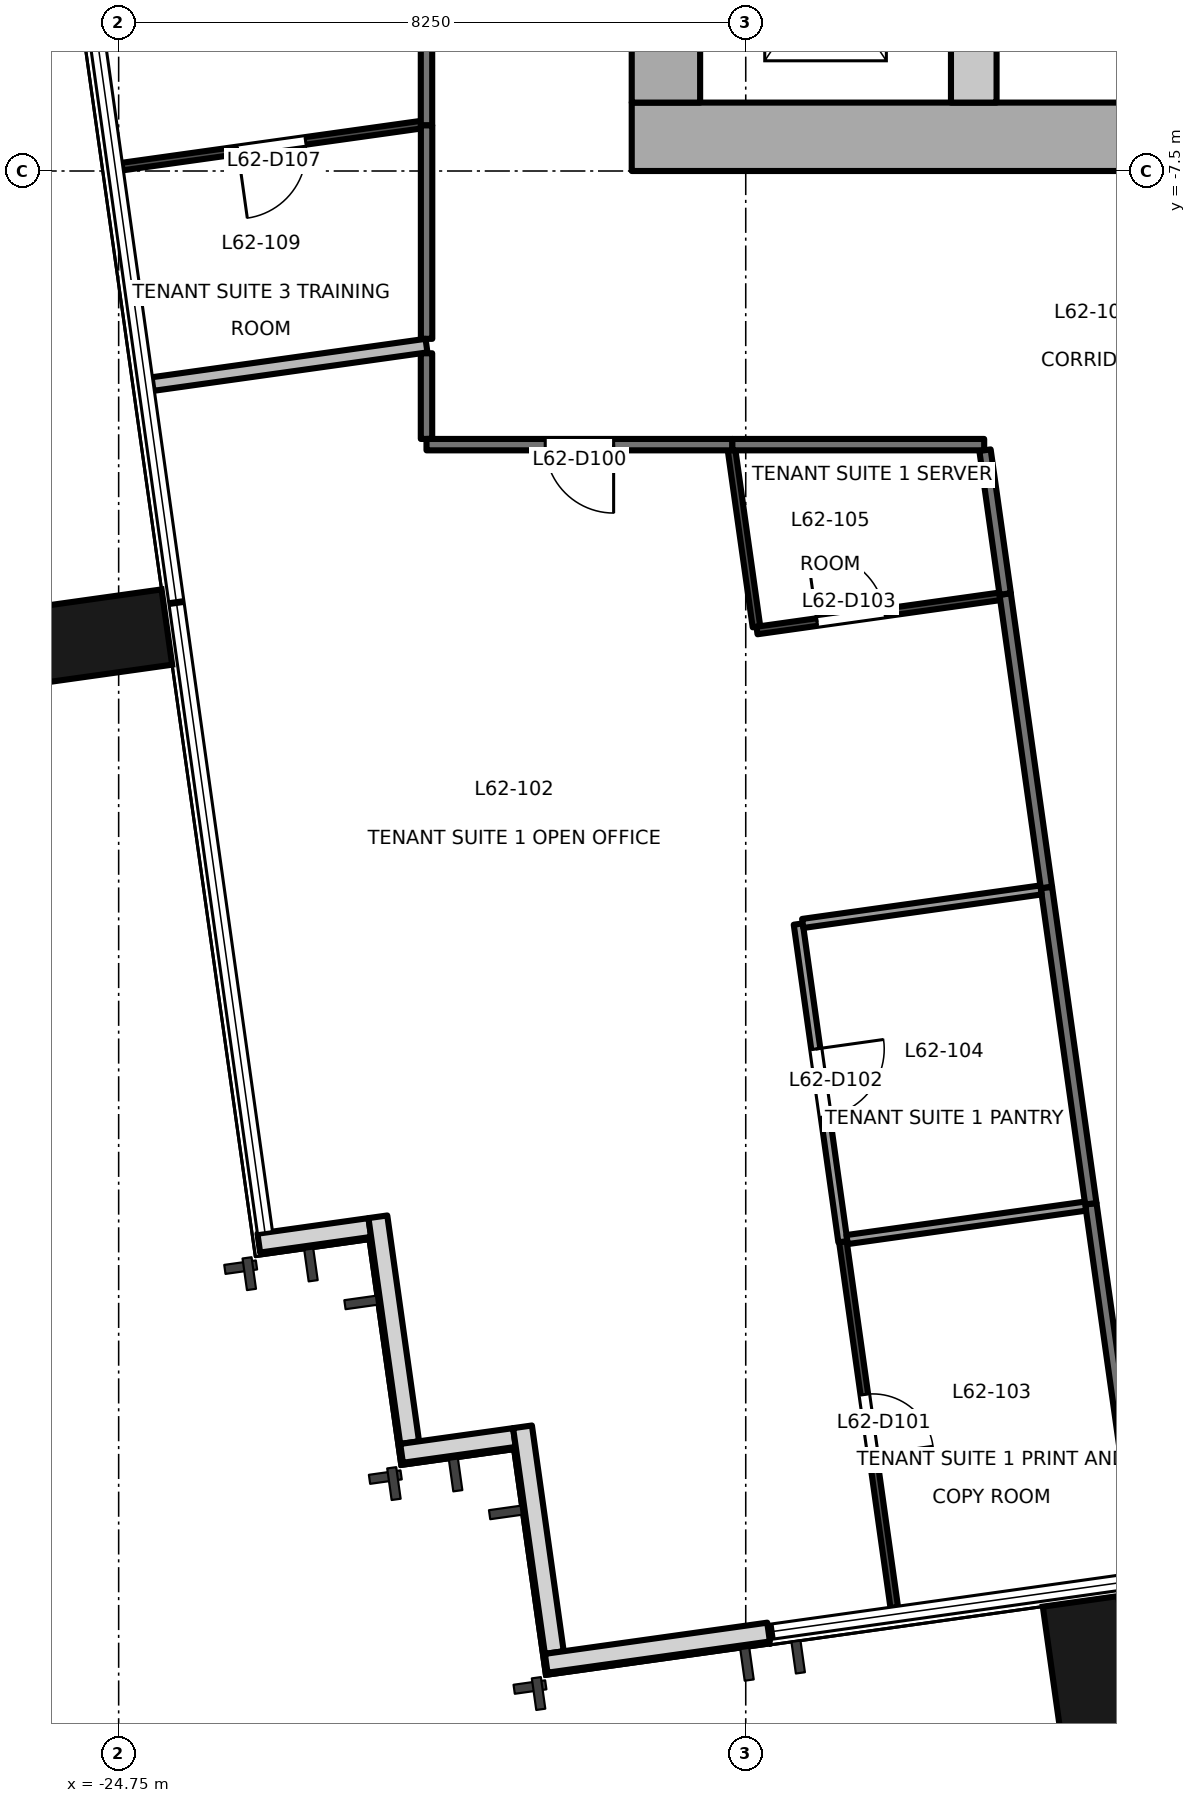
"""IFC4 building model, lengths in metres.
Left out: names, types, materials, properties, quantities, classifications, styles, units other than length and angle.
Written with IfcOpenShell. Run it as: python <this file> out.ifc"""

import sys

from ifc_helpers import new_model, si_unit, direction, frame, frame_2d, origin, origin_2d, place, context, subcontext, project, spatial, rectangle, extrude, element, fill, save


model = new_model("IFC4")
c1 = context("Model", 3, precision=1e-05, world=origin(), true_north=direction((0.0, 1.0)))
c2 = subcontext(c1, "Body", "Model", "MODEL_VIEW")
j1 = project(units=[si_unit("LENGTHUNIT", "METRE"), si_unit("PLANEANGLEUNIT", "RADIAN")], contexts=[c1])
p1 = place(None, origin())
s1 = spatial("IfcSite", under=j1, at=p1, CompositionType="ELEMENT")
p2 = place(p1, origin())
s2 = spatial("IfcBuilding", under=s1, at=p2, CompositionType="ELEMENT")
p3 = place(p2, frame((0.0, 0.0, 270.7)))
s3 = spatial("IfcBuildingStorey", under=s2, at=p3, CompositionType="ELEMENT", Elevation=270.7)
for number, where, z_axis, x_axis in (
    (1, (-11.971, -27.209, -0.2), (0.0, 0.0, 1.0), (0.99, 0.139, 0.0)),
    (2, (-25.007, -13.625, -0.2), (0.0, 0.0, 1.0), (-0.139, 0.99, 0.0)),
):
    element("IfcColumn", number, at=place(p3, frame(where, z_axis=z_axis, x_axis=x_axis)), inside=s3, PredefinedType="COLUMN", context=c2, shape_type="SweptSolid", body=[
        extrude(rectangle(XDim=1.0, YDim=1.8, at=origin_2d()), origin(), (0.0, 0.0, 1.0), 3.9),
    ])
p4 = place(p3, frame((-22.906, -21.605, 0.0), z_axis=(0.0, 0.0, 1.0), x_axis=(0.990235520307, 0.13940449893, 0.0)))
e3 = element("IfcWall", 3, at=p4, inside=s3, PredefinedType="SOLIDWALL", context=c2, shape_type="SweptSolid", body=[
    extrude(rectangle(XDim=1.475, YDim=0.25, at=frame_2d((0.737, 0.0))), origin(), (0.0, 0.0, 1.0), 3.7),
])
p5 = place(p3, frame((-21.34, -21.258, 0.0), z_axis=(0.0, 0.0, 1.0), x_axis=(0.139393225799, -0.990237107263, 0.0)))
e4 = element("IfcWall", 4, at=p5, inside=s3, PredefinedType="SOLIDWALL", context=c2, shape_type="SweptSolid", body=[
    extrude(rectangle(XDim=3.0, YDim=0.25, at=frame_2d((1.5, 0.0))), origin(), (0.0, 0.0, 1.0), 3.7),
])
p6 = place(p3, frame((-21.028, -24.37, 0.0), z_axis=(0.0, 0.0, 1.0), x_axis=(0.990330117064, 0.138730887823, 0.0)))
e5 = element("IfcWall", 5, at=p6, inside=s3, PredefinedType="SOLIDWALL", context=c2, shape_type="SweptSolid", body=[
    extrude(rectangle(XDim=1.499, YDim=0.25, at=frame_2d((0.75, 0.0))), origin(), (0.0, 0.0, 1.0), 3.7),
])
p7 = place(p3, frame((-19.437, -24.021, 0.0), z_axis=(0.0, 0.0, 1.0), x_axis=(0.139358350296, -0.990242015975, 0.0)))
e6 = element("IfcWall", 6, at=p7, inside=s3, PredefinedType="SOLIDWALL", context=c2, shape_type="SweptSolid", body=[
    extrude(rectangle(XDim=2.999, YDim=0.25, at=frame_2d((1.5, 0.0))), origin(), (0.0, 0.0, 1.0), 3.7),
])
p8 = place(p3, frame((-19.125, -27.132, 0.0), z_axis=(0.0, 0.0, 1.0), x_axis=(0.990291981483, 0.139002846771, 0.0)))
e7 = element("IfcWall", 7, at=p8, inside=s3, PredefinedType="SOLIDWALL", context=c2, shape_type="SweptSolid", body=[
    extrude(rectangle(XDim=2.954, YDim=0.25, at=frame_2d((1.477, 0.0))), origin(), (0.0, 0.0, 1.0), 3.7),
])
p9 = place(p3, frame((-18.0, -7.05, -0.2), z_axis=(0.0, 0.0, 1.0), x_axis=(1.0, 0.0, 0.0)))
e8 = element("IfcWall", 8, at=p9, inside=s3, PredefinedType="SHEAR", context=c2, shape_type="SweptSolid", body=[
    extrude(rectangle(XDim=36.0, YDim=0.9, at=frame_2d((18.0, 0.0))), origin(), (0.0, 0.0, 1.0), 3.9),
])
p10 = place(p9, frame((11.3, 0.0, 0.2)))
e9 = element("IfcOpeningElement", 9, at=p10, cuts=e8, PredefinedType="OPENING", context=c2, shape_type="SweptSolid", body=[
    extrude(rectangle(XDim=1.8, YDim=2.1, at=frame_2d((0.9, 1.05))), frame((0.0, 0.46, 0.0), z_axis=(0.0, -1.0, 0.0), x_axis=(1.0, 0.0, 0.0)), (0.0, 0.0, 1.0), 0.921),
])
p11 = place(p9, frame((16.8, 0.0, 0.2)))
e10 = element("IfcOpeningElement", 10, at=p11, cuts=e8, PredefinedType="OPENING", context=c2, shape_type="SweptSolid", body=[
    extrude(rectangle(XDim=2.4, YDim=2.1, at=frame_2d((1.2, 1.05))), frame((0.0, 0.46, 0.0), z_axis=(0.0, -1.0, 0.0), x_axis=(1.0, 0.0, 0.0)), (0.0, 0.0, 1.0), 0.921),
])
p12 = place(p9, frame((26.1, 0.0, 0.2)))
e11 = element("IfcOpeningElement", 11, at=p12, cuts=e8, PredefinedType="OPENING", context=c2, shape_type="SweptSolid", body=[
    extrude(rectangle(XDim=2.4, YDim=2.1, at=frame_2d((1.2, 1.05))), frame((0.0, 0.46, 0.0), z_axis=(0.0, -1.0, 0.0), x_axis=(1.0, 0.0, 0.0)), (0.0, 0.0, 1.0), 0.921),
])
p13 = place(p3, frame((-17.55, -6.6, -0.2), z_axis=(0.0, 0.0, 1.0), x_axis=(0.0, 1.0, 0.0)))
e12 = element("IfcWall", 12, at=p13, inside=s3, PredefinedType="SHEAR", context=c2, shape_type="SweptSolid", body=[
    extrude(rectangle(XDim=13.2, YDim=0.9, at=frame_2d((6.6, 0.0))), origin(), (0.0, 0.0, 1.0), 3.9),
])
p14 = place(p13, frame((4.55, 0.0, 0.2)))
e13 = element("IfcOpeningElement", 13, at=p14, cuts=e12, PredefinedType="OPENING", context=c2, shape_type="SweptSolid", body=[
    extrude(rectangle(XDim=1.2, YDim=2.1, at=frame_2d((0.6, 1.05))), frame((0.0, 0.46, 0.0), z_axis=(0.0, -1.0, 0.0), x_axis=(1.0, 0.0, 0.0)), (0.0, 0.0, 1.0), 0.921),
])
p15 = place(p3, frame((-13.5, -6.6, -0.2), z_axis=(0.0, 0.0, 1.0), x_axis=(0.0, 1.0, 0.0)))
e14 = element("IfcWall", 14, at=p15, inside=s3, PredefinedType="SHEAR", context=c2, shape_type="SweptSolid", body=[
    extrude(rectangle(XDim=13.2, YDim=0.6, at=frame_2d((6.6, 0.0))), origin(), (0.0, 0.0, 1.0), 3.9),
])
p16 = place(p3, frame((-20.7, -11.025, 0.0), z_axis=(0.0, 0.0, 1.0), x_axis=(0.0, 1.0, 0.0)))
e15 = element("IfcWall", 15, at=p16, inside=s3, PredefinedType="PARTITIONING", context=c2, shape_type="SweptSolid", body=[
    extrude(rectangle(XDim=1.127, YDim=0.15, at=frame_2d((0.563, 0.0))), origin(), (0.0, 0.0, 1.0), 3.7),
])
p17 = place(p3, frame((-16.676, -11.1, 0.0), z_axis=(0.0, 0.0, 1.0), x_axis=(-1.0, 0.0, 0.0)))
e16 = element("IfcWall", 16, at=p17, inside=s3, PredefinedType="PARTITIONING", context=c2, shape_type="SweptSolid", body=[
    extrude(rectangle(XDim=4.024, YDim=0.15, at=frame_2d((2.012, 0.0))), origin(), (0.0, 0.0, 1.0), 3.7),
])
p18 = place(p17, frame((1.562, 0.0, 0.0)))
e17 = element("IfcOpeningElement", 17, at=p18, cuts=e16, PredefinedType="OPENING", context=c2, shape_type="SweptSolid", body=[
    extrude(rectangle(XDim=0.9, YDim=2.1, at=frame_2d((0.45, 1.05))), frame((0.0, 0.085, 0.0), z_axis=(0.0, -1.0, 0.0), x_axis=(1.0, 0.0, 0.0)), (0.0, 0.0, 1.0), 0.171),
])
p19 = place(p3, frame((-12.544, -16.928, 0.0), z_axis=(0.0, 0.0, 1.0), x_axis=(-0.139221261089, 0.990261299083, 0.0)))
e18 = element("IfcWall", 18, at=p19, inside=s3, PredefinedType="PARTITIONING", context=c2, shape_type="SweptSolid", body=[
    extrude(rectangle(XDim=3.9, YDim=0.15, at=frame_2d((1.95, 0.0))), origin(), (0.0, 0.0, 1.0), 3.7),
])
p20 = place(p3, frame((-11.278, -25.939, 0.0), z_axis=(0.0, 0.0, 1.0), x_axis=(-0.139167797017, 0.990268814148, 0.0)))
e19 = element("IfcWall", 19, at=p20, inside=s3, PredefinedType="PARTITIONING", context=c2, shape_type="SweptSolid", body=[
    extrude(rectangle(XDim=4.9, YDim=0.15, at=frame_2d((2.45, 0.0))), origin(), (0.0, 0.0, 1.0), 3.7),
])
p21 = place(p3, frame((-11.96, -21.087, 0.0), z_axis=(0.0, 0.0, 1.0), x_axis=(-0.139052638616, 0.990284991148, 0.0)))
e20 = element("IfcWall", 20, at=p21, inside=s3, PredefinedType="PARTITIONING", context=c2, shape_type="SweptSolid", body=[
    extrude(rectangle(XDim=4.2, YDim=0.15, at=frame_2d((2.1, 0.0))), origin(), (0.0, 0.0, 1.0), 3.7),
])
p22 = place(p3, frame((-13.363, -11.1, 0.0), z_axis=(0.0, 0.0, 1.0), x_axis=(-1.0, 0.0, 0.0)))
e21 = element("IfcWall", 21, at=p22, inside=s3, PredefinedType="PARTITIONING", context=c2, shape_type="SweptSolid", body=[
    extrude(rectangle(XDim=3.313, YDim=0.15, at=frame_2d((1.656, 0.0))), origin(), (0.0, 0.0, 1.0), 2.8),
])
p23 = place(p3, frame((-13.086, -13.065, 0.0), z_axis=(0.0, 0.0, 1.0), x_axis=(-0.139292033523, 0.990251346577, 0.0)))
e22 = element("IfcWall", 22, at=p23, inside=s3, PredefinedType="PARTITIONING", context=c2, shape_type="SweptSolid", body=[
    extrude(rectangle(XDim=1.91, YDim=0.15, at=frame_2d((0.955, 0.0))), origin(), (0.0, 0.0, 1.0), 2.8),
])
p24 = place(p3, frame((-20.7, -6.9, 0.0), z_axis=(0.0, 0.0, 1.0), x_axis=(0.0, 1.0, 0.0)))
e23 = element("IfcWall", 23, at=p24, inside=s3, PredefinedType="PARTITIONING", context=c2, shape_type="SweptSolid", body=[
    extrude(rectangle(XDim=14.4, YDim=0.15, at=frame_2d((7.2, 0.0))), origin(), (0.0, 0.0, 1.0), 3.3),
])
p25 = place(p24, frame((3.275, 0.0, 0.0)))
e24 = element("IfcOpeningElement", 24, at=p25, cuts=e23, PredefinedType="OPENING", context=c2, shape_type="SweptSolid", body=[
    extrude(rectangle(XDim=1.8, YDim=2.1, at=frame_2d((0.9, 1.05))), frame((0.0, 0.085, 0.0), z_axis=(0.0, -1.0, 0.0), x_axis=(1.0, 0.0, 0.0)), (0.0, 0.0, 1.0), 0.171),
])
p26 = place(p3, frame((-20.699, -9.708, 0.0), z_axis=(0.0, 0.0, 1.0), x_axis=(0.0, 1.0, 0.0)))
e25 = element("IfcWall", 25, at=p26, inside=s3, PredefinedType="PARTITIONING", context=c2, shape_type="SweptSolid", body=[
    extrude(rectangle(XDim=2.808, YDim=0.15, at=frame_2d((1.404, 0.0))), origin(), (0.0, 0.0, 1.0), 3.7),
])
p27 = place(p3, frame((-15.222, -21.586, 0.0), z_axis=(0.0, 0.0, 1.0), x_axis=(0.139120882778, -0.990275406124, 0.0)))
e26 = element("IfcWall", 26, at=p27, inside=s3, PredefinedType="PARTITIONING", context=c2, shape_type="SweptSolid", body=[
    extrude(rectangle(XDim=4.859, YDim=0.1, at=frame_2d((2.43, 0.0))), origin(), (0.0, 0.0, 1.0), 3.7),
])
p28 = place(p27, frame((2.03, 0.0, 0.0)))
e27 = element("IfcOpeningElement", 27, at=p28, cuts=e26, PredefinedType="OPENING", context=c2, shape_type="SweptSolid", body=[
    extrude(rectangle(XDim=0.8, YDim=2.1, at=frame_2d((0.4, 1.05))), frame((0.0, 0.061, 0.0), z_axis=(0.0, -1.0, 0.0), x_axis=(1.0, 0.0, 0.0)), (0.0, 0.0, 1.0), 0.121),
])
p29 = place(p3, frame((-15.809, -17.407, 0.0), z_axis=(0.0, 0.0, 1.0), x_axis=(0.139136935655, -0.99027315077, 0.0)))
e28 = element("IfcWall", 28, at=p29, inside=s3, PredefinedType="PARTITIONING", context=c2, shape_type="SweptSolid", body=[
    extrude(rectangle(XDim=4.22, YDim=0.12, at=frame_2d((2.11, 0.0))), origin(), (0.0, 0.0, 1.0), 3.7),
])
p30 = place(p29, frame((1.66, 0.0, 0.0)))
e29 = element("IfcOpeningElement", 29, at=p30, cuts=e28, PredefinedType="OPENING", context=c2, shape_type="SweptSolid", body=[
    extrude(rectangle(XDim=0.9, YDim=2.1, at=frame_2d((0.45, 1.05))), frame((0.0, 0.071, 0.0), z_axis=(0.0, -1.0, 0.0), x_axis=(1.0, 0.0, 0.0)), (0.0, 0.0, 1.0), 0.141),
])
p31 = place(p3, frame((-12.615, -16.958, 0.0), z_axis=(0.0, 0.0, 1.0), x_axis=(-0.990254086283, -0.139272555084, 0.0)))
e30 = element("IfcWall", 30, at=p31, inside=s3, PredefinedType="PARTITIONING", context=c2, shape_type="SweptSolid", body=[
    extrude(rectangle(XDim=3.166, YDim=0.12, at=frame_2d((1.583, 0.0))), origin(), (0.0, 0.0, 1.0), 2.8),
])
p32 = place(p3, frame((-16.687, -11.168, 0.0), z_axis=(0.0, 0.0, 1.0), x_axis=(0.139560302367, -0.990213573934, 0.0)))
e31 = element("IfcWall", 31, at=p32, inside=s3, PredefinedType="PARTITIONING", context=c2, shape_type="SweptSolid", body=[
    extrude(rectangle(XDim=2.351, YDim=0.1, at=frame_2d((1.176, 0.0))), origin(), (0.0, 0.0, 1.0), 3.7),
])
p33 = place(p3, frame((-16.352, -13.545, 0.0), z_axis=(0.0, 0.0, 1.0), x_axis=(0.990264894561, 0.13919568456, 0.0)))
e32 = element("IfcWall", 32, at=p33, inside=s3, PredefinedType="PARTITIONING", context=c2, shape_type="SweptSolid", body=[
    extrude(rectangle(XDim=3.226, YDim=0.1, at=frame_2d((1.613, 0.0))), origin(), (0.0, 0.0, 1.0), 2.8),
])
p34 = place(p33, frame((0.798, 0.0, 0.0)))
e33 = element("IfcOpeningElement", 33, at=p34, cuts=e32, PredefinedType="OPENING", context=c2, shape_type="SweptSolid", body=[
    extrude(rectangle(XDim=0.9, YDim=2.1, at=frame_2d((0.45, 1.05))), frame((0.0, 0.061, 0.0), z_axis=(0.0, -1.0, 0.0), x_axis=(1.0, 0.0, 0.0)), (0.0, 0.0, 1.0), 0.121),
])
p35 = place(p3, frame((-24.304, -10.303, 0.0), z_axis=(0.0, 0.0, 1.0), x_axis=(0.990292681193, 0.138997861769, 0.0)))
e34 = element("IfcWall", 34, at=p35, inside=s3, PredefinedType="PARTITIONING", context=c2, shape_type="SweptSolid", body=[
    extrude(rectangle(XDim=3.639, YDim=0.18, at=frame_2d((1.82, 0.0))), origin(), (0.0, 0.0, 1.0), 3.7),
])
p36 = place(p3, frame((-15.166, -21.558, 0.0), z_axis=(0.0, 0.0, 1.0), x_axis=(0.990285967974, 0.139045681821, 0.0)))
e35 = element("IfcWall", 35, at=p36, inside=s3, PredefinedType="PARTITIONING", context=c2, shape_type="SweptSolid", body=[
    extrude(rectangle(XDim=3.166, YDim=0.12, at=frame_2d((1.583, 0.0))), origin(), (0.0, 0.0, 1.0), 2.8),
])
p37 = place(p3, frame((-20.768, -6.89, 0.0), z_axis=(0.0, 0.0, 1.0), x_axis=(-0.990313393589, -0.138850215981, 0.0)))
e36 = element("IfcWall", 36, at=p37, inside=s3, PredefinedType="PARTITIONING", context=c2, shape_type="SweptSolid", body=[
    extrude(rectangle(XDim=3.976, YDim=0.1, at=frame_2d((1.988, 0.0))), origin(), (0.0, 0.0, 1.0), 3.7),
])
p38 = place(p37, frame((1.538, 0.0, 0.0)))
e37 = element("IfcOpeningElement", 37, at=p38, cuts=e36, PredefinedType="OPENING", context=c2, shape_type="SweptSolid", body=[
    extrude(rectangle(XDim=0.9, YDim=2.1, at=frame_2d((0.45, 1.05))), frame((0.0, 0.061, 0.0), z_axis=(0.0, -1.0, 0.0), x_axis=(1.0, 0.0, 0.0)), (0.0, 0.0, 1.0), 0.121),
])
p39 = place(p18, origin())
e38 = element("IfcDoor", 38, at=p39, inside=s3, OperationType="SINGLE_SWING_LEFT", PredefinedType="DOOR", context=c2, shape_type="SweptSolid", body=[
    extrude(rectangle(XDim=0.9, YDim=2.1, at=frame_2d((0.45, 1.05))), frame((0.0, 0.025, 0.0), z_axis=(0.0, -1.0, 0.0), x_axis=(1.0, 0.0, 0.0)), (0.0, 0.0, 1.0), 0.05),
])
fill(e17, e38)
p40 = place(p28, origin())
e39 = element("IfcDoor", 39, at=p40, inside=s3, OperationType="SINGLE_SWING_RIGHT", PredefinedType="DOOR", context=c2, shape_type="SweptSolid", body=[
    extrude(rectangle(XDim=0.8, YDim=2.1, at=frame_2d((0.4, 1.05))), frame((0.0, 0.025, 0.0), z_axis=(0.0, -1.0, 0.0), x_axis=(1.0, 0.0, 0.0)), (0.0, 0.0, 1.0), 0.05),
])
fill(e27, e39)
p41 = place(p30, origin())
e40 = element("IfcDoor", 40, at=p41, inside=s3, OperationType="SINGLE_SWING_LEFT", PredefinedType="DOOR", context=c2, shape_type="SweptSolid", body=[
    extrude(rectangle(XDim=0.9, YDim=2.1, at=frame_2d((0.45, 1.05))), frame((0.0, 0.025, 0.0), z_axis=(0.0, -1.0, 0.0), x_axis=(1.0, 0.0, 0.0)), (0.0, 0.0, 1.0), 0.05),
])
fill(e29, e40)
p42 = place(p34, origin())
e41 = element("IfcDoor", 41, at=p42, inside=s3, OperationType="SINGLE_SWING_LEFT", PredefinedType="DOOR", context=c2, shape_type="SweptSolid", body=[
    extrude(rectangle(XDim=0.9, YDim=2.1, at=frame_2d((0.45, 1.05))), frame((0.0, 0.025, 0.0), z_axis=(0.0, -1.0, 0.0), x_axis=(1.0, 0.0, 0.0)), (0.0, 0.0, 1.0), 0.05),
])
fill(e33, e41)
p43 = place(p38, origin())
e42 = element("IfcDoor", 42, at=p43, inside=s3, OperationType="SINGLE_SWING_RIGHT", PredefinedType="DOOR", context=c2, shape_type="SweptSolid", body=[
    extrude(rectangle(XDim=0.9, YDim=2.1, at=frame_2d((0.45, 1.05))), frame((0.0, 0.025, 0.0), z_axis=(0.0, -1.0, 0.0), x_axis=(1.0, 0.0, 0.0)), (0.0, 0.0, 1.0), 0.05),
])
fill(e37, e42)
save(model, sys.argv[1])
